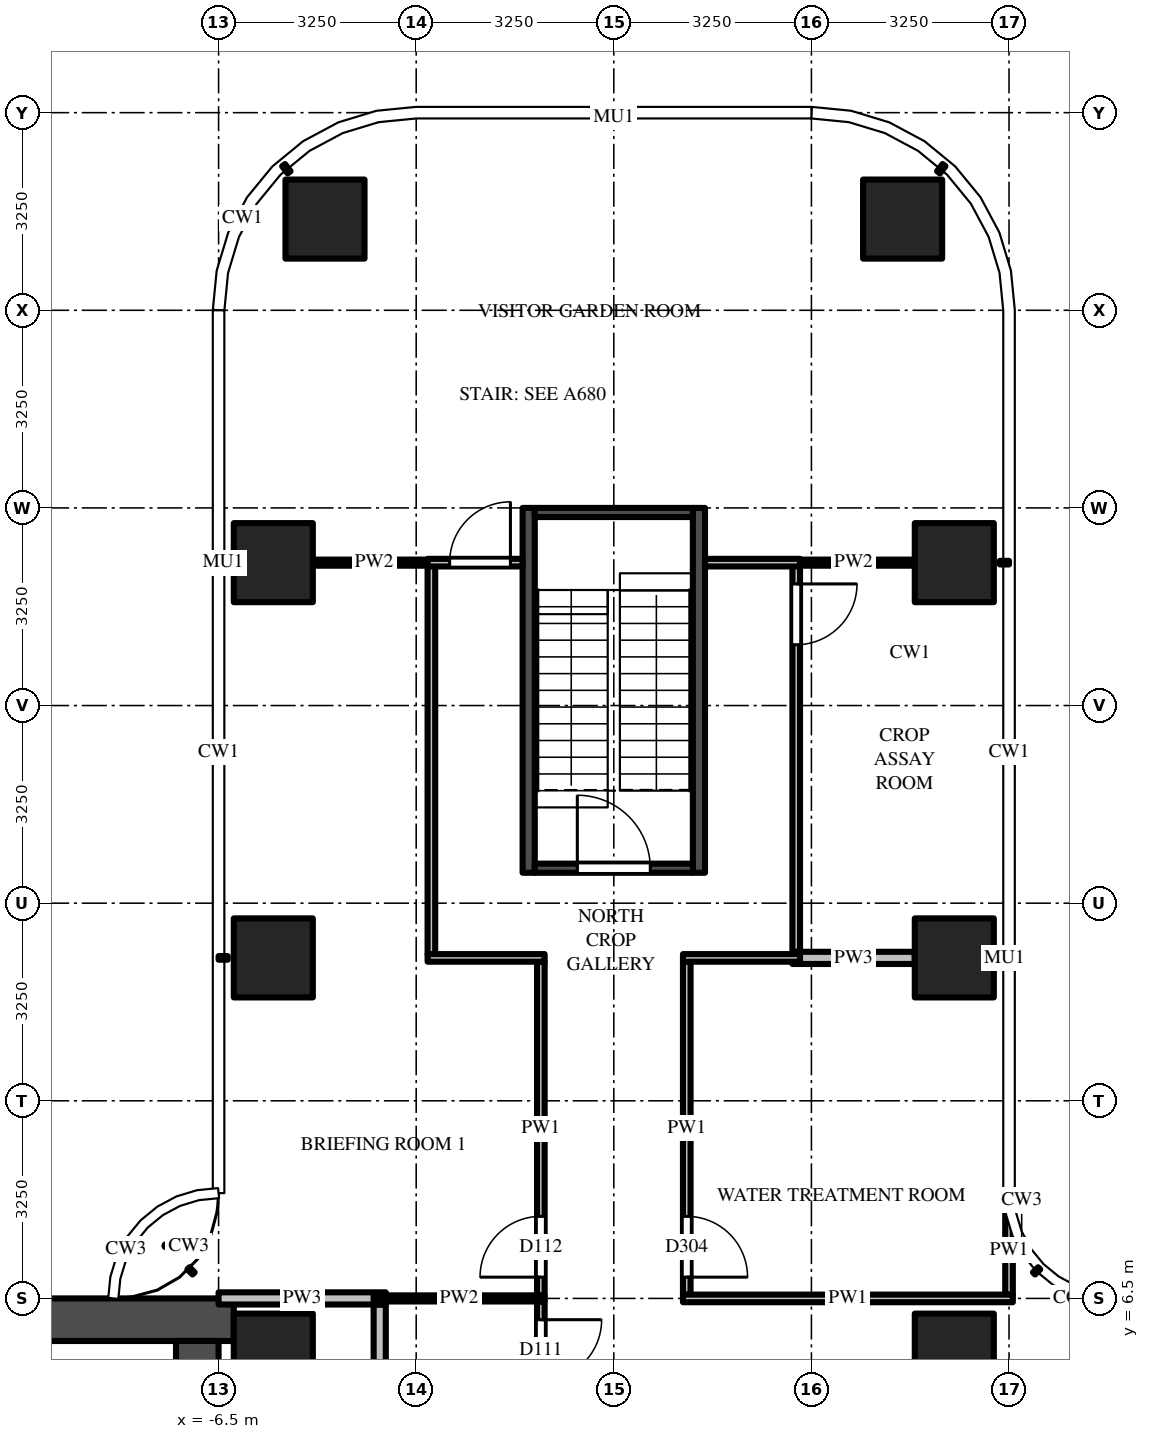
"""IFC4 building model, lengths in metres.
Left out: names, types, materials, properties, quantities, classifications, styles, units other than length and angle.
Written with IfcOpenShell. Run it as: python <this file> out.ifc"""

import sys

from ifc_helpers import new_model, si_unit, direction, frame, frame_2d, origin, origin_2d, place, context, subcontext, project, spatial, rectangle, extrude, source, transform, mapped, element, fill, save


model = new_model("IFC4")
c1 = context("Model", 3, precision=1e-05, world=origin(), true_north=direction((0.0, 1.0)))
c2 = subcontext(c1, "Body", "Model", "MODEL_VIEW")
j1 = project(units=[si_unit("LENGTHUNIT", "METRE"), si_unit("PLANEANGLEUNIT", "RADIAN")], contexts=[c1])
p1 = place(None, origin())
s1 = spatial("IfcSite", under=j1, at=p1, CompositionType="ELEMENT")
p2 = place(p1, origin())
s2 = spatial("IfcBuilding", under=s1, at=p2, CompositionType="ELEMENT")
p3 = place(p2, frame((0.0, 0.0, 142.5)))
s3 = spatial("IfcBuildingStorey", under=s2, at=p3, CompositionType="ELEMENT", Elevation=142.5)
m1 = source(origin(), c2, "Body", "SweptSolid", [
    extrude(rectangle(XDim=1.3, YDim=1.3, at=origin_2d()), origin(), (0.0, 0.0, 1.0), 4.5),
])
for number, where, z_axis, x_axis in (
    (1, (-5.6, 12.1, 0.0), (0.0, 0.0, 1.0), (1.0, 0.0, 0.0)),
    (2, (-5.6, 18.6, 0.0), (0.0, 0.0, 1.0), (1.0, 0.0, 0.0)),
    (3, (-4.75, 24.25, 0.0), (0.0, 0.0, 1.0), (1.0, 0.0, 0.0)),
    (4, (5.6, 12.1, 0.0), (0.0, 0.0, 1.0), (1.0, 0.0, 0.0)),
    (5, (5.6, 18.6, 0.0), (0.0, 0.0, 1.0), (1.0, 0.0, 0.0)),
    (6, (4.75, 24.25, 0.0), (0.0, 0.0, 1.0), (1.0, 0.0, 0.0)),
    (7, (5.6, 5.6, 0.0), (0.0, 0.0, 1.0), (1.0, 0.0, 0.0)),
    (8, (-5.6, 5.6, 0.0), (0.0, 0.0, 1.0), (1.0, 0.0, 0.0)),
):
    element("IfcColumn", number, at=place(p3, frame(where, z_axis=z_axis, x_axis=x_axis)), inside=s3, PredefinedType="COLUMN", context=c2, shape_type="MappedRepresentation", body=[
        mapped(m1, transform((0.0, 0.0, 0.0))),
    ])
m2 = source(origin(), c2, "Body", "SweptSolid", [
    extrude(rectangle(XDim=16.5, YDim=0.7, at=frame_2d((8.25, 0.0))), origin(), (0.0, 0.0, 1.0), 4.25),
])
p4 = place(p3, frame((-6.25, 6.15, 0.0), z_axis=(0.0, 0.0, 1.0), x_axis=(-1.0, 0.0, 0.0)))
e9 = element("IfcWall", 9, at=p4, inside=s3, PredefinedType="SHEAR", context=c2, shape_type="MappedRepresentation", body=[
    mapped(m2, transform((0.0, 0.0, 0.0))),
])
m3 = source(origin(), c2, "Body", "SweptSolid", [
    extrude(rectangle(XDim=9.05, YDim=0.7, at=frame_2d((4.525, 0.0))), origin(), (0.0, 0.0, 1.0), 4.25),
])
p5 = place(p3, frame((-6.85, 5.8, 0.0), z_axis=(0.0, 0.0, 1.0), x_axis=(0.0, -1.0, 0.0)))
e10 = element("IfcWall", 10, at=p5, inside=s3, PredefinedType="SHEAR", context=c2, shape_type="MappedRepresentation", body=[
    mapped(m3, transform((0.0, 0.0, 0.0))),
])
m4 = source(origin(), c2, "Body", "SweptSolid", [
    extrude(rectangle(XDim=1.8, YDim=2.1, at=frame_2d((0.9, 1.05))), frame((0.0, 0.36, 0.0), z_axis=(0.0, -1.0, 0.0), x_axis=(1.0, 0.0, 0.0)), (0.0, 0.0, 1.0), 0.72),
])
p6 = place(p5, frame((3.15, 0.0, 0.0)))
e11 = element("IfcOpeningElement", 11, at=p6, cuts=e10, PredefinedType="OPENING", context=c2, shape_type="MappedRepresentation", body=[
    mapped(m4, transform((0.0, 0.0, 0.0))),
])
m5 = source(origin(), c2, "Body", "SweptSolid", [
    extrude(rectangle(XDim=6.0, YDim=0.2, at=frame_2d((3.0, 0.0))), origin(), (0.0, 0.0, 1.0), 4.25),
])
for number, where, z_axis, x_axis in (
    (12, (-1.4, 13.5, 0.0), (0.0, 0.0, 1.0), (0.0, 1.0, 0.0)),
    (13, (1.4, 13.5, 0.0), (0.0, 0.0, 1.0), (0.0, 1.0, 0.0)),
):
    element("IfcWall", number, at=place(p3, frame(where, z_axis=z_axis, x_axis=x_axis)), inside=s3, PredefinedType="SHEAR", context=c2, shape_type="MappedRepresentation", body=[
        mapped(m5, transform((0.0, 0.0, 0.0))),
    ])
m6 = source(origin(), c2, "Body", "SweptSolid", [
    extrude(rectangle(XDim=2.6, YDim=0.15, at=frame_2d((1.3, 0.0))), origin(), (0.0, 0.0, 1.0), 4.25),
])
p7 = place(p3, frame((-1.3, 13.575, 0.0), z_axis=(0.0, 0.0, 1.0), x_axis=(1.0, 0.0, 0.0)))
e14 = element("IfcWall", 14, at=p7, inside=s3, PredefinedType="SHEAR", context=c2, shape_type="MappedRepresentation", body=[
    mapped(m6, transform((0.0, 0.0, 0.0))),
])
m7 = source(origin(), c2, "Body", "SweptSolid", [
    extrude(rectangle(XDim=1.2, YDim=2.1, at=frame_2d((0.6, 1.05))), frame((0.0, 0.085, 0.0), z_axis=(0.0, -1.0, 0.0), x_axis=(1.0, 0.0, 0.0)), (0.0, 0.0, 1.0), 0.17),
])
p8 = place(p7, frame((0.7, 0.0, 0.0)))
e15 = element("IfcOpeningElement", 15, at=p8, cuts=e14, PredefinedType="OPENING", context=c2, shape_type="MappedRepresentation", body=[
    mapped(m7, transform((0.0, 0.0, 0.0))),
])
p9 = place(p3, frame((-1.3, 19.425, 0.0), z_axis=(0.0, 0.0, 1.0), x_axis=(1.0, 0.0, 0.0)))
e16 = element("IfcWall", 16, at=p9, inside=s3, PredefinedType="SHEAR", context=c2, shape_type="MappedRepresentation", body=[
    mapped(m6, transform((0.0, 0.0, 0.0))),
])
m8 = source(origin(), c2, "Body", "SweptSolid", [
    extrude(rectangle(XDim=3.087, YDim=0.2, at=frame_2d((1.544, 0.0))), origin(), (0.0, 0.0, 1.0), 3.468),
])
p10 = place(p3, frame((-3.85, 3.312, 0.0), z_axis=(0.0, 0.0, 1.0), x_axis=(0.0, 1.0, 0.0)))
e17 = element("IfcWall", 17, at=p10, inside=s3, PredefinedType="PARTITIONING", context=c2, shape_type="MappedRepresentation", body=[
    mapped(m8, transform((0.0, 0.0, 0.0))),
])
m9 = source(origin(), c2, "Body", "SweptSolid", [
    extrude(rectangle(XDim=6.387, YDim=0.125, at=frame_2d((3.194, 0.0))), origin(), (0.0, 0.0, 1.0), 3.468),
])
p11 = place(p3, frame((-3.0, 12.163, 0.0), z_axis=(0.0, 0.0, 1.0), x_axis=(0.0, 1.0, 0.0)))
e18 = element("IfcWall", 18, at=p11, inside=s3, PredefinedType="PARTITIONING", context=c2, shape_type="MappedRepresentation", body=[
    mapped(m9, transform((0.0, 0.0, 0.0))),
])
m10 = source(origin(), c2, "Body", "SweptSolid", [
    extrude(rectangle(XDim=3.137, YDim=0.125, at=frame_2d((1.569, 0.0))), origin(), (0.0, 0.0, 1.0), 3.468),
])
p12 = place(p3, frame((-1.2, 6.45, 0.0), z_axis=(0.0, 0.0, 1.0), x_axis=(0.0, -1.0, 0.0)))
e19 = element("IfcWall", 19, at=p12, inside=s3, PredefinedType="PARTITIONING", context=c2, shape_type="MappedRepresentation", body=[
    mapped(m10, transform((0.0, 0.0, 0.0))),
])
m11 = source(origin(), c2, "Body", "SweptSolid", [
    extrude(rectangle(XDim=1.0, YDim=2.1, at=frame_2d((0.5, 1.05))), frame((0.0, 0.073, 0.0), z_axis=(0.0, -1.0, 0.0), x_axis=(1.0, 0.0, 0.0)), (0.0, 0.0, 1.0), 0.145),
])
p13 = place(p12, frame((0.3, 0.0, 0.0)))
e20 = element("IfcOpeningElement", 20, at=p13, cuts=e19, PredefinedType="OPENING", context=c2, shape_type="MappedRepresentation", body=[
    mapped(m11, transform((0.0, 0.0, 0.0))),
])
m12 = source(origin(), c2, "Body", "SweptSolid", [
    extrude(rectangle(XDim=5.488, YDim=0.125, at=frame_2d((2.744, 0.0))), origin(), (0.0, 0.0, 1.0), 3.468),
])
p14 = place(p3, frame((-1.2, 6.55, 0.0), z_axis=(0.0, 0.0, 1.0), x_axis=(0.0, 1.0, 0.0)))
e21 = element("IfcWall", 21, at=p14, inside=s3, PredefinedType="PARTITIONING", context=c2, shape_type="MappedRepresentation", body=[
    mapped(m12, transform((0.0, 0.0, 0.0))),
])
p15 = place(p14, frame((0.3, 0.0, 0.0)))
e22 = element("IfcOpeningElement", 22, at=p15, cuts=e21, PredefinedType="OPENING", context=c2, shape_type="MappedRepresentation", body=[
    mapped(m11, transform((0.0, 0.0, 0.0))),
])
m13 = source(origin(), c2, "Body", "SweptSolid", [
    extrude(rectangle(XDim=5.475, YDim=0.125, at=frame_2d((2.738, 0.0))), origin(), (0.0, 0.0, 1.0), 3.468),
])
p16 = place(p3, frame((1.2, 12.038, 0.0), z_axis=(0.0, 0.0, 1.0), x_axis=(0.0, -1.0, 0.0)))
e23 = element("IfcWall", 23, at=p16, inside=s3, PredefinedType="PARTITIONING", context=c2, shape_type="MappedRepresentation", body=[
    mapped(m13, transform((0.0, 0.0, 0.0))),
])
p17 = place(p16, frame((4.188, 0.0, 0.0)))
e24 = element("IfcOpeningElement", 24, at=p17, cuts=e23, PredefinedType="OPENING", context=c2, shape_type="MappedRepresentation", body=[
    mapped(m11, transform((0.0, 0.0, 0.0))),
])
m14 = source(origin(), c2, "Body", "SweptSolid", [
    extrude(rectangle(XDim=6.35, YDim=0.125, at=frame_2d((3.175, 0.0))), origin(), (0.0, 0.0, 1.0), 3.468),
])
p18 = place(p3, frame((3.0, 18.55, 0.0), z_axis=(0.0, 0.0, 1.0), x_axis=(0.0, -1.0, 0.0)))
e25 = element("IfcWall", 25, at=p18, inside=s3, PredefinedType="PARTITIONING", context=c2, shape_type="MappedRepresentation", body=[
    mapped(m14, transform((0.0, 0.0, 0.0))),
])
p19 = place(p18, frame((0.3, 0.0, 0.0)))
e26 = element("IfcOpeningElement", 26, at=p19, cuts=e25, PredefinedType="OPENING", context=c2, shape_type="MappedRepresentation", body=[
    mapped(m11, transform((0.0, 0.0, 0.0))),
])
m15 = source(origin(), c2, "Body", "SweptSolid", [
    extrude(rectangle(XDim=1.469, YDim=0.125, at=frame_2d((0.734, 0.0))), origin(), (0.0, 0.0, 1.0), 4.25),
])
p20 = place(p3, frame((6.5, 6.562, 0.0), z_axis=(0.0, 0.0, 1.0), x_axis=(0.0, 1.0, 0.0)))
e27 = element("IfcWall", 27, at=p20, inside=s3, PredefinedType="PARTITIONING", context=c2, shape_type="MappedRepresentation", body=[
    mapped(m15, transform((0.0, 0.0, 0.0))),
])
m16 = source(origin(), c2, "Body", "SweptSolid", [
    extrude(rectangle(XDim=2.75, YDim=0.2, at=frame_2d((1.375, 0.0))), origin(), (0.0, 0.0, 1.0), 3.33),
])
p21 = place(p3, frame((-6.5, 6.5, 0.0), z_axis=(0.0, 0.0, 1.0), x_axis=(1.0, 0.0, 0.0)))
e28 = element("IfcWall", 28, at=p21, inside=s3, PredefinedType="PARTITIONING", context=c2, shape_type="MappedRepresentation", body=[
    mapped(m16, transform((0.0, 0.0, 0.0))),
])
m17 = source(origin(), c2, "Body", "SweptSolid", [
    extrude(rectangle(XDim=2.812, YDim=0.1, at=frame_2d((1.406, 0.0))), origin(), (0.0, 0.0, 1.0), 4.25),
])
p22 = place(p3, frame((-3.95, 6.5, 0.0), z_axis=(0.0, 0.0, 1.0), x_axis=(1.0, 0.0, 0.0)))
e29 = element("IfcWall", 29, at=p22, inside=s3, PredefinedType="PARTITIONING", context=c2, shape_type="MappedRepresentation", body=[
    mapped(m17, transform((0.0, 0.0, 0.0))),
])
m18 = source(origin(), c2, "Body", "SweptSolid", [
    extrude(rectangle(XDim=5.425, YDim=0.125, at=frame_2d((2.712, 0.0))), origin(), (0.0, 0.0, 1.0), 3.33),
])
p23 = place(p3, frame((1.137, 6.5, 0.0), z_axis=(0.0, 0.0, 1.0), x_axis=(1.0, 0.0, 0.0)))
e30 = element("IfcWall", 30, at=p23, inside=s3, PredefinedType="PARTITIONING", context=c2, shape_type="MappedRepresentation", body=[
    mapped(m18, transform((0.0, 0.0, 0.0))),
])
m19 = source(origin(), c2, "Body", "SweptSolid", [
    extrude(rectangle(XDim=2.012, YDim=0.2, at=frame_2d((1.006, 0.0))), origin(), (0.0, 0.0, 1.0), 3.468),
])
p24 = place(p3, frame((2.938, 12.1, 0.0), z_axis=(0.0, 0.0, 1.0), x_axis=(1.0, 0.0, 0.0)))
e31 = element("IfcWall", 31, at=p24, inside=s3, PredefinedType="PARTITIONING", context=c2, shape_type="MappedRepresentation", body=[
    mapped(m19, transform((0.0, 0.0, 0.0))),
])
m20 = source(origin(), c2, "Body", "SweptSolid", [
    extrude(rectangle(XDim=1.925, YDim=0.125, at=frame_2d((0.962, 0.0))), origin(), (0.0, 0.0, 1.0), 3.468),
])
for number, where, z_axis, x_axis in (
    (32, (-1.137, 12.1, 0.0), (0.0, 0.0, 1.0), (-1.0, 0.0, 0.0)),
    (33, (3.062, 12.1, 0.0), (0.0, 0.0, 1.0), (-1.0, 0.0, 0.0)),
):
    element("IfcWall", number, at=place(p3, frame(where, z_axis=z_axis, x_axis=x_axis)), inside=s3, PredefinedType="PARTITIONING", context=c2, shape_type="MappedRepresentation", body=[
        mapped(m20, transform((0.0, 0.0, 0.0))),
    ])
m21 = source(origin(), c2, "Body", "SweptSolid", [
    extrude(rectangle(XDim=2.012, YDim=0.1, at=frame_2d((1.006, 0.0))), origin(), (0.0, 0.0, 1.0), 3.697),
])
for number, where, z_axis, x_axis in (
    (34, (-4.95, 18.6, 0.0), (0.0, 0.0, 1.0), (1.0, 0.0, 0.0)),
    (35, (2.938, 18.6, 0.0), (0.0, 0.0, 1.0), (1.0, 0.0, 0.0)),
):
    element("IfcWall", number, at=place(p3, frame(where, z_axis=z_axis, x_axis=x_axis)), inside=s3, PredefinedType="PARTITIONING", context=c2, shape_type="MappedRepresentation", body=[
        mapped(m21, transform((0.0, 0.0, 0.0))),
    ])
m22 = source(origin(), c2, "Body", "SweptSolid", [
    extrude(rectangle(XDim=1.562, YDim=0.125, at=frame_2d((0.781, 0.0))), origin(), (0.0, 0.0, 1.0), 3.697),
])
p25 = place(p3, frame((-3.062, 18.6, 0.0), z_axis=(0.0, 0.0, 1.0), x_axis=(1.0, 0.0, 0.0)))
e36 = element("IfcWall", 36, at=p25, inside=s3, PredefinedType="PARTITIONING", context=c2, shape_type="MappedRepresentation", body=[
    mapped(m22, transform((0.0, 0.0, 0.0))),
])
p26 = place(p25, frame((0.363, 0.0, 0.0)))
e37 = element("IfcOpeningElement", 37, at=p26, cuts=e36, PredefinedType="OPENING", context=c2, shape_type="MappedRepresentation", body=[
    mapped(m11, transform((0.0, 0.0, 0.0))),
])
p27 = place(p3, frame((1.5, 18.6, 0.0), z_axis=(0.0, 0.0, 1.0), x_axis=(1.0, 0.0, 0.0)))
e38 = element("IfcWall", 38, at=p27, inside=s3, PredefinedType="PARTITIONING", context=c2, shape_type="MappedRepresentation", body=[
    mapped(m22, transform((0.0, 0.0, 0.0))),
])
m23 = source(origin(), c2, "Body", "SweptSolid", [
    extrude(rectangle(XDim=1.2, YDim=2.1, at=frame_2d((0.6, 1.05))), frame((0.0, 0.025, 0.0), z_axis=(0.0, -1.0, 0.0), x_axis=(1.0, 0.0, 0.0)), (0.0, 0.0, 1.0), 0.05),
])
p28 = place(p8, origin())
e39 = element("IfcDoor", 39, at=p28, inside=s3, OperationType="SINGLE_SWING_LEFT", PredefinedType="DOOR", context=c2, shape_type="MappedRepresentation", body=[
    mapped(m23, transform((0.0, 0.0, 0.0))),
])
fill(e15, e39)
m24 = source(origin(), c2, "Body", "SweptSolid", [
    extrude(rectangle(XDim=1.0, YDim=2.1, at=frame_2d((0.5, 1.05))), frame((0.0, 0.025, 0.0), z_axis=(0.0, -1.0, 0.0), x_axis=(1.0, 0.0, 0.0)), (0.0, 0.0, 1.0), 0.05),
])
p29 = place(p13, origin())
e40 = element("IfcDoor", 40, at=p29, inside=s3, OperationType="SINGLE_SWING_LEFT", PredefinedType="DOOR", context=c2, shape_type="MappedRepresentation", body=[
    mapped(m24, transform((0.0, 0.0, 0.0))),
])
fill(e20, e40)
p30 = place(p15, origin())
e41 = element("IfcDoor", 41, at=p30, inside=s3, OperationType="SINGLE_SWING_LEFT", PredefinedType="DOOR", context=c2, shape_type="MappedRepresentation", body=[
    mapped(m24, transform((0.0, 0.0, 0.0))),
])
fill(e22, e41)
p31 = place(p17, origin())
e42 = element("IfcDoor", 42, at=p31, inside=s3, OperationType="SINGLE_SWING_RIGHT", PredefinedType="DOOR", context=c2, shape_type="MappedRepresentation", body=[
    mapped(m24, transform((0.0, 0.0, 0.0))),
])
fill(e24, e42)
p32 = place(p19, origin())
e43 = element("IfcDoor", 43, at=p32, inside=s3, OperationType="SINGLE_SWING_LEFT", PredefinedType="DOOR", context=c2, shape_type="MappedRepresentation", body=[
    mapped(m24, transform((0.0, 0.0, 0.0))),
])
fill(e26, e43)
p33 = place(p26, origin())
e44 = element("IfcDoor", 44, at=p33, inside=s3, OperationType="SINGLE_SWING_RIGHT", PredefinedType="DOOR", context=c2, shape_type="MappedRepresentation", body=[
    mapped(m24, transform((0.0, 0.0, 0.0))),
])
fill(e37, e44)
save(model, sys.argv[1])
